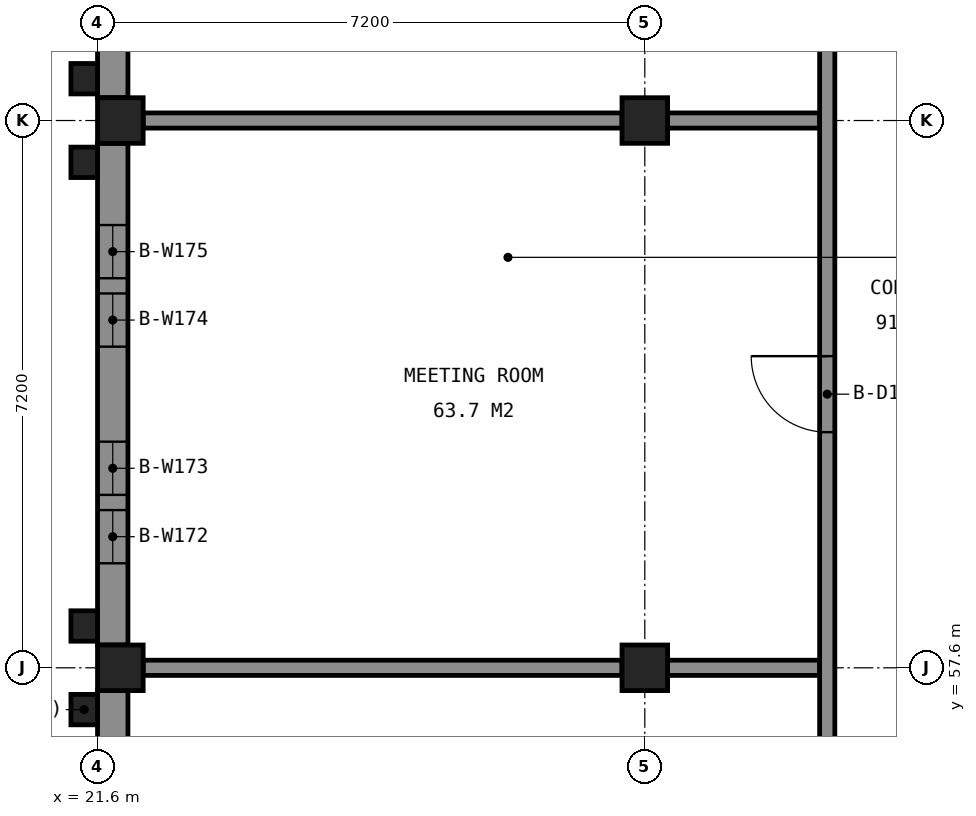
"""IFC4 building model, lengths in metres.
Left out: names, types, materials, properties, quantities, classifications, styles, units other than length and angle.
Written with IfcOpenShell. Run it as: python <this file> out.ifc"""

import sys

from ifc_helpers import new_model, si_unit, direction, frame, frame_2d, origin, origin_2d, place, context, subcontext, project, spatial, rectangle, extrude, element, fill, save


model = new_model("IFC4")
c1 = context("Model", 3, precision=1e-05, world=origin(), true_north=direction((0.0, 1.0)))
c2 = subcontext(c1, "Body", "Model", "MODEL_VIEW")
j1 = project(units=[si_unit("LENGTHUNIT", "METRE"), si_unit("PLANEANGLEUNIT", "RADIAN")], contexts=[c1])
p1 = place(None, origin())
s1 = spatial("IfcSite", under=j1, at=p1, CompositionType="ELEMENT")
p2 = place(p1, origin())
s2 = spatial("IfcBuilding", under=s1, at=p2, CompositionType="ELEMENT")
p3 = place(p2, frame((0.0, 0.0, 14.4)))
s3 = spatial("IfcBuildingStorey", under=s2, at=p3, CompositionType="ELEMENT", Elevation=14.4)
for number, where, z_axis, x_axis in (
    (1, (21.9, 57.6, 0.0), (0.0, 0.0, 1.0), (1.0, 0.0, 0.0)),
    (2, (21.9, 64.8, 0.0), (0.0, 0.0, 1.0), (1.0, 0.0, 0.0)),
):
    element("IfcColumn", number, at=place(p3, frame(where, z_axis=z_axis, x_axis=x_axis)), inside=s3, PredefinedType="COLUMN", context=c2, shape_type="SweptSolid", body=[
        extrude(rectangle(XDim=0.6, YDim=0.6, at=origin_2d()), origin(), (0.0, 0.0, 1.0), 4.144),
    ])
for number, where, z_axis, x_axis in (
    (3, (28.8, 57.6, 0.0), (0.0, 0.0, 1.0), (1.0, 0.0, 0.0)),
    (4, (28.8, 64.8, 0.0), (0.0, 0.0, 1.0), (1.0, 0.0, 0.0)),
):
    element("IfcColumn", number, at=place(p3, frame(where, z_axis=z_axis, x_axis=x_axis)), inside=s3, PredefinedType="COLUMN", context=c2, shape_type="SweptSolid", body=[
        extrude(rectangle(XDim=0.6, YDim=0.6, at=origin_2d()), origin(), (0.0, 0.0, 1.0), 4.911),
    ])
p4 = place(p3, frame((21.8, 50.7, 0.0), z_axis=(0.0, 0.0, 1.0), x_axis=(0.0, 1.0, 0.0)))
e5 = element("IfcWall", 5, at=p4, inside=s3, PredefinedType="SOLIDWALL", context=c2, shape_type="SweptSolid", body=[
    extrude(rectangle(XDim=6.6, YDim=0.4, at=frame_2d((3.3, 0.0))), origin(), (0.0, 0.0, 1.0), 4.133),
])
p5 = place(p4, frame((1.075, 0.0, 1.6)))
e6 = element("IfcOpeningElement", 6, at=p5, cuts=e5, PredefinedType="OPENING", context=c2, shape_type="SweptSolid", body=[
    extrude(rectangle(XDim=0.7, YDim=1.2, at=frame_2d((0.35, 0.6))), frame((0.0, 0.21, 0.0), z_axis=(0.0, -1.0, 0.0), x_axis=(1.0, 0.0, 0.0)), (0.0, 0.0, 1.0), 0.42),
])
p6 = place(p4, frame((1.975, 0.0, 1.6)))
e7 = element("IfcOpeningElement", 7, at=p6, cuts=e5, PredefinedType="OPENING", context=c2, shape_type="SweptSolid", body=[
    extrude(rectangle(XDim=0.7, YDim=1.2, at=frame_2d((0.35, 0.6))), frame((0.0, 0.21, 0.0), z_axis=(0.0, -1.0, 0.0), x_axis=(1.0, 0.0, 0.0)), (0.0, 0.0, 1.0), 0.42),
])
p7 = place(p4, frame((3.925, 0.0, 1.6)))
e8 = element("IfcOpeningElement", 8, at=p7, cuts=e5, PredefinedType="OPENING", context=c2, shape_type="SweptSolid", body=[
    extrude(rectangle(XDim=0.7, YDim=1.2, at=frame_2d((0.35, 0.6))), frame((0.0, 0.21, 0.0), z_axis=(0.0, -1.0, 0.0), x_axis=(1.0, 0.0, 0.0)), (0.0, 0.0, 1.0), 0.42),
])
p8 = place(p4, frame((4.825, 0.0, 1.6)))
e9 = element("IfcOpeningElement", 9, at=p8, cuts=e5, PredefinedType="OPENING", context=c2, shape_type="SweptSolid", body=[
    extrude(rectangle(XDim=0.7, YDim=1.2, at=frame_2d((0.35, 0.6))), frame((0.0, 0.21, 0.0), z_axis=(0.0, -1.0, 0.0), x_axis=(1.0, 0.0, 0.0)), (0.0, 0.0, 1.0), 0.42),
])
p9 = place(p3, frame((21.8, 57.9, 0.0), z_axis=(0.0, 0.0, 1.0), x_axis=(0.0, 1.0, 0.0)))
e10 = element("IfcWall", 10, at=p9, inside=s3, PredefinedType="SOLIDWALL", context=c2, shape_type="SweptSolid", body=[
    extrude(rectangle(XDim=6.6, YDim=0.4, at=frame_2d((3.3, 0.0))), origin(), (0.0, 0.0, 1.0), 4.133),
])
p10 = place(p9, frame((1.075, 0.0, 1.6)))
e11 = element("IfcOpeningElement", 11, at=p10, cuts=e10, PredefinedType="OPENING", context=c2, shape_type="SweptSolid", body=[
    extrude(rectangle(XDim=0.7, YDim=1.2, at=frame_2d((0.35, 0.6))), frame((0.0, 0.21, 0.0), z_axis=(0.0, -1.0, 0.0), x_axis=(1.0, 0.0, 0.0)), (0.0, 0.0, 1.0), 0.42),
])
p11 = place(p9, frame((1.975, 0.0, 1.6)))
e12 = element("IfcOpeningElement", 12, at=p11, cuts=e10, PredefinedType="OPENING", context=c2, shape_type="SweptSolid", body=[
    extrude(rectangle(XDim=0.7, YDim=1.2, at=frame_2d((0.35, 0.6))), frame((0.0, 0.21, 0.0), z_axis=(0.0, -1.0, 0.0), x_axis=(1.0, 0.0, 0.0)), (0.0, 0.0, 1.0), 0.42),
])
p12 = place(p9, frame((3.925, 0.0, 1.6)))
e13 = element("IfcOpeningElement", 13, at=p12, cuts=e10, PredefinedType="OPENING", context=c2, shape_type="SweptSolid", body=[
    extrude(rectangle(XDim=0.7, YDim=1.2, at=frame_2d((0.35, 0.6))), frame((0.0, 0.21, 0.0), z_axis=(0.0, -1.0, 0.0), x_axis=(1.0, 0.0, 0.0)), (0.0, 0.0, 1.0), 0.42),
])
p13 = place(p9, frame((4.825, 0.0, 1.6)))
e14 = element("IfcOpeningElement", 14, at=p13, cuts=e10, PredefinedType="OPENING", context=c2, shape_type="SweptSolid", body=[
    extrude(rectangle(XDim=0.7, YDim=1.2, at=frame_2d((0.35, 0.6))), frame((0.0, 0.21, 0.0), z_axis=(0.0, -1.0, 0.0), x_axis=(1.0, 0.0, 0.0)), (0.0, 0.0, 1.0), 0.42),
])
p14 = place(p3, frame((21.8, 65.1, 0.0), z_axis=(0.0, 0.0, 1.0), x_axis=(0.0, 1.0, 0.0)))
e15 = element("IfcWall", 15, at=p14, inside=s3, PredefinedType="SOLIDWALL", context=c2, shape_type="SweptSolid", body=[
    extrude(rectangle(XDim=6.3, YDim=0.4, at=frame_2d((3.15, 0.0))), origin(), (0.0, 0.0, 1.0), 4.133),
])
p15 = place(p14, frame((1.0, 0.0, 1.6)))
e16 = element("IfcOpeningElement", 16, at=p15, cuts=e15, PredefinedType="OPENING", context=c2, shape_type="SweptSolid", body=[
    extrude(rectangle(XDim=0.7, YDim=1.2, at=frame_2d((0.35, 0.6))), frame((0.0, 0.21, 0.0), z_axis=(0.0, -1.0, 0.0), x_axis=(1.0, 0.0, 0.0)), (0.0, 0.0, 1.0), 0.42),
])
p16 = place(p14, frame((1.9, 0.0, 1.6)))
e17 = element("IfcOpeningElement", 17, at=p16, cuts=e15, PredefinedType="OPENING", context=c2, shape_type="SweptSolid", body=[
    extrude(rectangle(XDim=0.7, YDim=1.2, at=frame_2d((0.35, 0.6))), frame((0.0, 0.21, 0.0), z_axis=(0.0, -1.0, 0.0), x_axis=(1.0, 0.0, 0.0)), (0.0, 0.0, 1.0), 0.42),
])
p17 = place(p14, frame((3.7, 0.0, 1.6)))
e18 = element("IfcOpeningElement", 18, at=p17, cuts=e15, PredefinedType="OPENING", context=c2, shape_type="SweptSolid", body=[
    extrude(rectangle(XDim=0.7, YDim=1.2, at=frame_2d((0.35, 0.6))), frame((0.0, 0.21, 0.0), z_axis=(0.0, -1.0, 0.0), x_axis=(1.0, 0.0, 0.0)), (0.0, 0.0, 1.0), 0.42),
])
p18 = place(p14, frame((4.6, 0.0, 1.6)))
e19 = element("IfcOpeningElement", 19, at=p18, cuts=e15, PredefinedType="OPENING", context=c2, shape_type="SweptSolid", body=[
    extrude(rectangle(XDim=0.7, YDim=1.2, at=frame_2d((0.35, 0.6))), frame((0.0, 0.21, 0.0), z_axis=(0.0, -1.0, 0.0), x_axis=(1.0, 0.0, 0.0)), (0.0, 0.0, 1.0), 0.42),
])
for number, where, z_axis, x_axis in (
    (20, (21.425, 57.05, 0.0), (0.0, 0.0, 1.0), (1.0, 0.0, 0.0)),
    (21, (21.425, 58.15, 0.0), (0.0, 0.0, 1.0), (1.0, 0.0, 0.0)),
    (22, (21.425, 64.25, 0.0), (0.0, 0.0, 1.0), (1.0, 0.0, 0.0)),
    (23, (21.425, 65.35, 0.0), (0.0, 0.0, 1.0), (1.0, 0.0, 0.0)),
):
    element("IfcColumn", number, at=place(p3, frame(where, z_axis=z_axis, x_axis=x_axis)), inside=s3, PredefinedType="COLUMN", context=c2, shape_type="SweptSolid", body=[
        extrude(rectangle(XDim=0.35, YDim=0.4, at=origin_2d()), origin(), (0.0, 0.0, 1.0), 4.1),
    ])
p19 = place(p3, frame((22.2, 57.6, 0.0), z_axis=(0.0, 0.0, 1.0), x_axis=(1.0, 0.0, 0.0)))
e24 = element("IfcWall", 24, at=p19, inside=s3, PredefinedType="PARTITIONING", context=c2, shape_type="SweptSolid", body=[
    extrude(rectangle(XDim=6.3, YDim=0.2, at=frame_2d((3.15, 0.0))), origin(), (0.0, 0.0, 1.0), 4.0),
])
p20 = place(p3, frame((29.1, 57.6, 0.0), z_axis=(0.0, 0.0, 1.0), x_axis=(1.0, 0.0, 0.0)))
e25 = element("IfcWall", 25, at=p20, inside=s3, PredefinedType="PARTITIONING", context=c2, shape_type="SweptSolid", body=[
    extrude(rectangle(XDim=2.0, YDim=0.2, at=frame_2d((1.0, 0.0))), origin(), (0.0, 0.0, 1.0), 4.0),
])
p21 = place(p3, frame((22.2, 64.8, 0.0), z_axis=(0.0, 0.0, 1.0), x_axis=(1.0, 0.0, 0.0)))
e26 = element("IfcWall", 26, at=p21, inside=s3, PredefinedType="PARTITIONING", context=c2, shape_type="SweptSolid", body=[
    extrude(rectangle(XDim=6.3, YDim=0.2, at=frame_2d((3.15, 0.0))), origin(), (0.0, 0.0, 1.0), 4.0),
])
p22 = place(p3, frame((29.1, 64.8, 0.0), z_axis=(0.0, 0.0, 1.0), x_axis=(1.0, 0.0, 0.0)))
e27 = element("IfcWall", 27, at=p22, inside=s3, PredefinedType="PARTITIONING", context=c2, shape_type="SweptSolid", body=[
    extrude(rectangle(XDim=2.0, YDim=0.2, at=frame_2d((1.0, 0.0))), origin(), (0.0, 0.0, 1.0), 4.0),
])
p23 = place(p3, frame((31.2, 29.2, 0.0), z_axis=(0.0, 0.0, 1.0), x_axis=(0.0, 1.0, 0.0)))
e28 = element("IfcWall", 28, at=p23, inside=s3, PredefinedType="PARTITIONING", context=c2, shape_type="SweptSolid", body=[
    extrude(rectangle(XDim=42.4, YDim=0.2, at=frame_2d((21.2, 0.0))), origin(), (0.0, 0.0, 1.0), 4.0),
])
p24 = place(p23, frame((2.7, 0.0, 0.0)))
e29 = element("IfcOpeningElement", 29, at=p24, cuts=e28, PredefinedType="OPENING", context=c2, shape_type="SweptSolid", body=[
    extrude(rectangle(XDim=1.0, YDim=2.1, at=frame_2d((0.5, 1.05))), frame((0.0, 0.11, 0.0), z_axis=(0.0, -1.0, 0.0), x_axis=(1.0, 0.0, 0.0)), (0.0, 0.0, 1.0), 0.22),
])
p25 = place(p23, frame((9.9, 0.0, 0.0)))
e30 = element("IfcOpeningElement", 30, at=p25, cuts=e28, PredefinedType="OPENING", context=c2, shape_type="SweptSolid", body=[
    extrude(rectangle(XDim=1.0, YDim=2.1, at=frame_2d((0.5, 1.05))), frame((0.0, 0.11, 0.0), z_axis=(0.0, -1.0, 0.0), x_axis=(1.0, 0.0, 0.0)), (0.0, 0.0, 1.0), 0.22),
])
p26 = place(p23, frame((17.1, 0.0, 0.0)))
e31 = element("IfcOpeningElement", 31, at=p26, cuts=e28, PredefinedType="OPENING", context=c2, shape_type="SweptSolid", body=[
    extrude(rectangle(XDim=1.0, YDim=2.1, at=frame_2d((0.5, 1.05))), frame((0.0, 0.11, 0.0), z_axis=(0.0, -1.0, 0.0), x_axis=(1.0, 0.0, 0.0)), (0.0, 0.0, 1.0), 0.22),
])
p27 = place(p23, frame((24.3, 0.0, 0.0)))
e32 = element("IfcOpeningElement", 32, at=p27, cuts=e28, PredefinedType="OPENING", context=c2, shape_type="SweptSolid", body=[
    extrude(rectangle(XDim=1.0, YDim=2.1, at=frame_2d((0.5, 1.05))), frame((0.0, 0.11, 0.0), z_axis=(0.0, -1.0, 0.0), x_axis=(1.0, 0.0, 0.0)), (0.0, 0.0, 1.0), 0.22),
])
p28 = place(p23, frame((31.5, 0.0, 0.0)))
e33 = element("IfcOpeningElement", 33, at=p28, cuts=e28, PredefinedType="OPENING", context=c2, shape_type="SweptSolid", body=[
    extrude(rectangle(XDim=1.0, YDim=2.1, at=frame_2d((0.5, 1.05))), frame((0.0, 0.11, 0.0), z_axis=(0.0, -1.0, 0.0), x_axis=(1.0, 0.0, 0.0)), (0.0, 0.0, 1.0), 0.22),
])
p29 = place(p23, frame((38.7, 0.0, 0.0)))
e34 = element("IfcOpeningElement", 34, at=p29, cuts=e28, PredefinedType="OPENING", context=c2, shape_type="SweptSolid", body=[
    extrude(rectangle(XDim=1.0, YDim=2.1, at=frame_2d((0.5, 1.05))), frame((0.0, 0.11, 0.0), z_axis=(0.0, -1.0, 0.0), x_axis=(1.0, 0.0, 0.0)), (0.0, 0.0, 1.0), 0.22),
])
p30 = place(p10, origin())
e35 = element("IfcWindow", 35, at=p30, inside=s3, PartitioningType="SINGLE_PANEL", PredefinedType="WINDOW", context=c2, shape_type="SweptSolid", body=[
    extrude(rectangle(XDim=0.7, YDim=1.2, at=frame_2d((0.35, 0.6))), frame((0.0, 0.03, 0.0), z_axis=(0.0, -1.0, 0.0), x_axis=(1.0, 0.0, 0.0)), (0.0, 0.0, 1.0), 0.06),
])
fill(e11, e35)
p31 = place(p11, origin())
e36 = element("IfcWindow", 36, at=p31, inside=s3, PartitioningType="SINGLE_PANEL", PredefinedType="WINDOW", context=c2, shape_type="SweptSolid", body=[
    extrude(rectangle(XDim=0.7, YDim=1.2, at=frame_2d((0.35, 0.6))), frame((0.0, 0.03, 0.0), z_axis=(0.0, -1.0, 0.0), x_axis=(1.0, 0.0, 0.0)), (0.0, 0.0, 1.0), 0.06),
])
fill(e12, e36)
p32 = place(p12, origin())
e37 = element("IfcWindow", 37, at=p32, inside=s3, PartitioningType="SINGLE_PANEL", PredefinedType="WINDOW", context=c2, shape_type="SweptSolid", body=[
    extrude(rectangle(XDim=0.7, YDim=1.2, at=frame_2d((0.35, 0.6))), frame((0.0, 0.03, 0.0), z_axis=(0.0, -1.0, 0.0), x_axis=(1.0, 0.0, 0.0)), (0.0, 0.0, 1.0), 0.06),
])
fill(e13, e37)
p33 = place(p13, origin())
e38 = element("IfcWindow", 38, at=p33, inside=s3, PartitioningType="SINGLE_PANEL", PredefinedType="WINDOW", context=c2, shape_type="SweptSolid", body=[
    extrude(rectangle(XDim=0.7, YDim=1.2, at=frame_2d((0.35, 0.6))), frame((0.0, 0.03, 0.0), z_axis=(0.0, -1.0, 0.0), x_axis=(1.0, 0.0, 0.0)), (0.0, 0.0, 1.0), 0.06),
])
fill(e14, e38)
p34 = place(p28, origin())
e39 = element("IfcDoor", 39, at=p34, inside=s3, OperationType="SINGLE_SWING_RIGHT", PredefinedType="DOOR", context=c2, shape_type="SweptSolid", body=[
    extrude(rectangle(XDim=1.0, YDim=2.1, at=frame_2d((0.5, 1.05))), frame((0.0, 0.025, 0.0), z_axis=(0.0, -1.0, 0.0), x_axis=(1.0, 0.0, 0.0)), (0.0, 0.0, 1.0), 0.05),
])
fill(e33, e39)
save(model, sys.argv[1])
